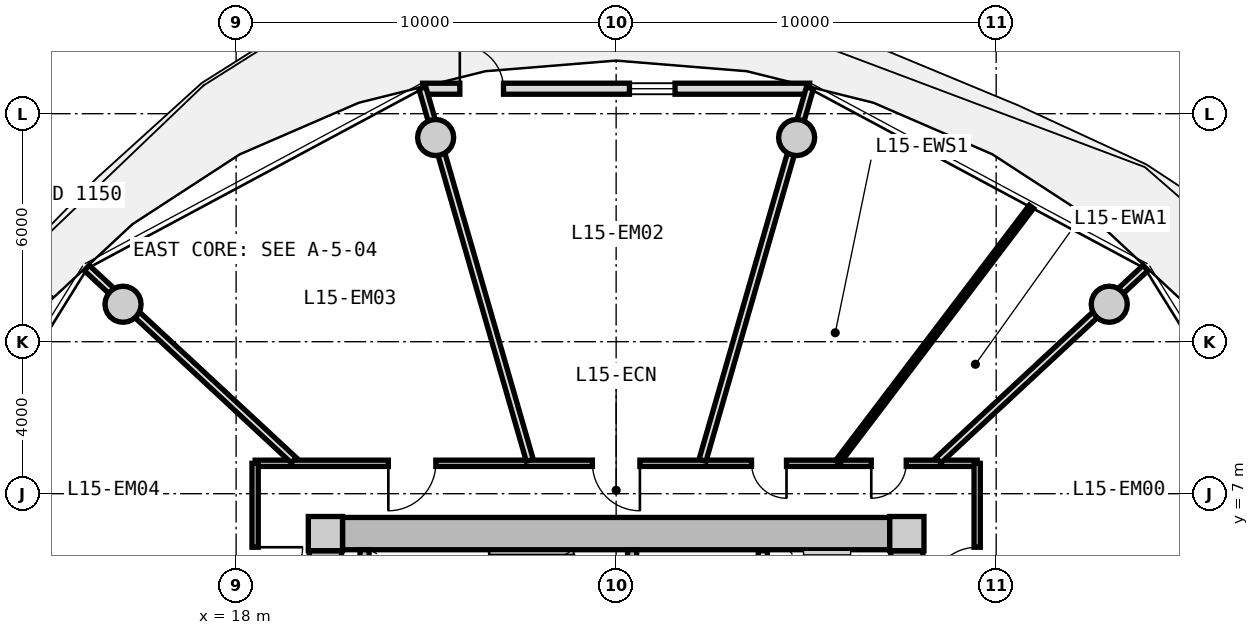
"""IFC4 building model, lengths in metres.
Left out: names, types, materials, properties, quantities, classifications, styles, units other than length and angle.
Written with IfcOpenShell. Run it as: python <this file> out.ifc"""

import sys

from ifc_helpers import new_model, si_unit, direction, frame, frame_2d, origin, origin_2d, place, context, subcontext, project, spatial, rectangle, circle, extrude, source, transform, mapped, element, fill, save


model = new_model("IFC4")
c1 = context("Model", 3, precision=1e-05, world=origin(), true_north=direction((0.0, 1.0)))
c2 = subcontext(c1, "Body", "Model", "MODEL_VIEW")
j1 = project(units=[si_unit("LENGTHUNIT", "METRE"), si_unit("PLANEANGLEUNIT", "RADIAN")], contexts=[c1])
p1 = place(None, origin())
s1 = spatial("IfcSite", under=j1, at=p1, CompositionType="ELEMENT")
p2 = place(p1, origin())
s2 = spatial("IfcBuilding", under=s1, at=p2, CompositionType="ELEMENT")
p3 = place(p2, frame((0.0, 0.0, 52.1)))
s3 = spatial("IfcBuildingStorey", under=s2, at=p3, CompositionType="ELEMENT", Elevation=52.1)
m1 = source(origin(), c2, "Body", "SweptSolid", [
    extrude(rectangle(XDim=0.9, YDim=0.9, at=origin_2d()), origin(), (0.0, 0.0, 1.0), 3.05),
])
for number, where, z_axis, x_axis in (
    (1, (35.65, 5.95, 0.0), (0.0, 0.0, 1.0), (1.0, 0.0, 0.0)),
    (2, (20.35, 5.95, 0.0), (0.0, 0.0, 1.0), (1.0, 0.0, 0.0)),
):
    element("IfcColumn", number, at=place(p3, frame(where, z_axis=z_axis, x_axis=x_axis)), inside=s3, PredefinedType="COLUMN", context=c2, shape_type="MappedRepresentation", body=[
        mapped(m1, transform((0.0, 0.0, 0.0), x_axis=(1.0, 0.0, 0.0), y_axis=(0.0, 1.0, 0.0), z_axis=(0.0, 0.0, 1.0), scale=1.0)),
    ])
m2 = source(origin(), c2, "Body", "SweptSolid", [
    extrude(rectangle(XDim=14.4, YDim=0.85, at=frame_2d((7.2, 0.0))), origin(), (0.0, 0.0, 1.0), 2.79),
])
p4 = place(p3, frame((20.8, 5.95, 0.0), z_axis=(0.0, 0.0, 1.0), x_axis=(1.0, 0.0, 0.0)))
e3 = element("IfcWall", 3, at=p4, inside=s3, PredefinedType="SHEAR", context=c2, shape_type="MappedRepresentation", body=[
    mapped(m2, transform((0.0, 0.0, 0.0), x_axis=(1.0, 0.0, 0.0), y_axis=(0.0, 1.0, 0.0), z_axis=(0.0, 0.0, 1.0), scale=1.0)),
])
m3 = source(origin(), c2, "Body", "SweptSolid", [
    extrude(rectangle(XDim=11.0, YDim=0.85, at=frame_2d((5.5, 0.0))), origin(), (0.0, 0.0, 1.0), 2.79),
])
p5 = place(p3, frame((20.35, -5.5, 0.0), z_axis=(0.0, 0.0, 1.0), x_axis=(0.0, 1.0, 0.0)))
e4 = element("IfcWall", 4, at=p5, inside=s3, PredefinedType="SHEAR", context=c2, shape_type="MappedRepresentation", body=[
    mapped(m3, transform((0.0, 0.0, 0.0), x_axis=(1.0, 0.0, 0.0), y_axis=(0.0, 1.0, 0.0), z_axis=(0.0, 0.0, 1.0), scale=1.0)),
])
p6 = place(p5, frame((3.8, 0.0, 0.0)))
e5 = element("IfcOpeningElement", 5, at=p6, cuts=e4, PredefinedType="OPENING", context=c2, shape_type="SweptSolid", body=[
    extrude(rectangle(XDim=1.2, YDim=2.15, at=frame_2d((0.6, 1.075))), frame((0.0, 0.435, 0.0), z_axis=(0.0, -1.0, 0.0), x_axis=(1.0, 0.0, 0.0)), (0.0, 0.0, 1.0), 0.87),
])
p7 = place(p3, frame((35.65, 5.5, 0.0), z_axis=(0.0, 0.0, 1.0), x_axis=(0.0, -1.0, 0.0)))
e6 = element("IfcWall", 6, at=p7, inside=s3, PredefinedType="SHEAR", context=c2, shape_type="MappedRepresentation", body=[
    mapped(m3, transform((0.0, 0.0, 0.0), x_axis=(1.0, 0.0, 0.0), y_axis=(0.0, 1.0, 0.0), z_axis=(0.0, 0.0, 1.0), scale=1.0)),
])
p8 = place(p7, frame((5.65, 0.0, 0.0)))
e7 = element("IfcOpeningElement", 7, at=p8, cuts=e6, PredefinedType="OPENING", context=c2, shape_type="SweptSolid", body=[
    extrude(rectangle(XDim=1.2, YDim=2.15, at=frame_2d((0.6, 1.075))), frame((0.0, 0.435, 0.0), z_axis=(0.0, -1.0, 0.0), x_axis=(1.0, 0.0, 0.0)), (0.0, 0.0, 1.0), 0.87),
])
m4 = source(origin(), c2, "Body", "SweptSolid", [
    extrude(circle(Radius=0.475, at=origin_2d()), origin(), (0.0, 0.0, 1.0), 3.05),
])
for number, where, z_axis, x_axis in (
    (8, (40.975, 11.985, 0.0), (0.0, 0.0, 1.0), (1.0, 0.0, 0.0)),
    (9, (32.749, 16.373, 0.0), (0.0, 0.0, 1.0), (1.0, 0.0, 0.0)),
    (10, (23.251, 16.373, 0.0), (0.0, 0.0, 1.0), (1.0, 0.0, 0.0)),
    (11, (15.025, 11.985, 0.0), (0.0, 0.0, 1.0), (1.0, 0.0, 0.0)),
):
    element("IfcColumn", number, at=place(p3, frame(where, z_axis=z_axis, x_axis=x_axis)), inside=s3, PredefinedType="COLUMN", context=c2, shape_type="MappedRepresentation", body=[
        mapped(m4, transform((0.0, 0.0, 0.0), x_axis=(1.0, 0.0, 0.0), y_axis=(0.0, 1.0, 0.0), z_axis=(0.0, 0.0, 1.0), scale=1.0)),
    ])
m5 = source(origin(), c2, "Body", "SweptSolid", [
    extrude(rectangle(XDim=10.187, YDim=0.29, at=frame_2d((5.094, 0.0))), origin(), (0.0, 0.0, 1.0), 2.79),
])
p9 = place(p3, frame((22.906, 17.657, 0.0), z_axis=(0.0, 0.0, 1.0), x_axis=(1.0, 0.0, 0.0)))
e12 = element("IfcWall", 12, at=p9, inside=s3, PredefinedType="SOLIDWALL", context=c2, shape_type="MappedRepresentation", body=[
    mapped(m5, transform((0.0, 0.0, 0.0), x_axis=(1.0, 0.0, 0.0), y_axis=(0.0, 1.0, 0.0), z_axis=(0.0, 0.0, 1.0), scale=1.0)),
])
p10 = place(p9, frame((0.98, 0.0, 0.0)))
e13 = element("IfcOpeningElement", 13, at=p10, cuts=e12, PredefinedType="OPENING", context=c2, shape_type="SweptSolid", body=[
    extrude(rectangle(XDim=1.15, YDim=2.25, at=frame_2d((0.575, 1.125))), frame((0.0, 0.155, 0.0), z_axis=(0.0, -1.0, 0.0), x_axis=(1.0, 0.0, 0.0)), (0.0, 0.0, 1.0), 0.31),
])
p11 = place(p9, frame((5.444, 0.0, 0.85)))
e14 = element("IfcOpeningElement", 14, at=p11, cuts=e12, PredefinedType="OPENING", context=c2, shape_type="SweptSolid", body=[
    extrude(rectangle(XDim=1.2, YDim=1.5, at=frame_2d((0.6, 0.75))), frame((0.0, 0.155, 0.0), z_axis=(0.0, -1.0, 0.0), x_axis=(1.0, 0.0, 0.0)), (0.0, 0.0, 1.0), 0.31),
])
m6 = source(origin(), c2, "Body", "SweptSolid", [
    extrude(rectangle(XDim=3.075, YDim=0.24, at=frame_2d((1.538, 0.0))), origin(), (0.0, 0.0, 1.0), 2.79),
])
p12 = place(p3, frame((21.38, 2.45, 0.0), z_axis=(0.0, 0.0, 1.0), x_axis=(0.0, 1.0, 0.0)))
e15 = element("IfcWall", 15, at=p12, inside=s3, PredefinedType="PARTITIONING", context=c2, shape_type="MappedRepresentation", body=[
    mapped(m6, transform((0.0, 0.0, 0.0), x_axis=(1.0, 0.0, 0.0), y_axis=(0.0, 1.0, 0.0), z_axis=(0.0, 0.0, 1.0), scale=1.0)),
])
p13 = place(p3, frame((28.42, 2.45, 0.0), z_axis=(0.0, 0.0, 1.0), x_axis=(0.0, 1.0, 0.0)))
e16 = element("IfcWall", 16, at=p13, inside=s3, PredefinedType="PARTITIONING", context=c2, shape_type="MappedRepresentation", body=[
    mapped(m6, transform((0.0, 0.0, 0.0), x_axis=(1.0, 0.0, 0.0), y_axis=(0.0, 1.0, 0.0), z_axis=(0.0, 0.0, 1.0), scale=1.0)),
])
p14 = place(p13, frame((0.55, 0.0, 0.0)))
e17 = element("IfcOpeningElement", 17, at=p14, cuts=e16, PredefinedType="OPENING", context=c2, shape_type="SweptSolid", body=[
    extrude(rectangle(XDim=1.1, YDim=2.15, at=frame_2d((0.55, 1.075))), frame((0.0, 0.13, 0.0), z_axis=(0.0, -1.0, 0.0), x_axis=(1.0, 0.0, 0.0)), (0.0, 0.0, 1.0), 0.26),
])
m7 = source(origin(), c2, "Body", "SweptSolid", [
    extrude(rectangle(XDim=5.0, YDim=0.24, at=frame_2d((2.5, 0.0))), origin(), (0.0, 0.0, 1.0), 2.775),
])
p15 = place(p3, frame((31.86, 0.5, 0.0), z_axis=(0.0, 0.0, 1.0), x_axis=(0.0, 1.0, 0.0)))
e18 = element("IfcWall", 18, at=p15, inside=s3, PredefinedType="PARTITIONING", context=c2, shape_type="MappedRepresentation", body=[
    mapped(m7, transform((0.0, 0.0, 0.0), x_axis=(1.0, 0.0, 0.0), y_axis=(0.0, 1.0, 0.0), z_axis=(0.0, 0.0, 1.0), scale=1.0)),
])
p16 = place(p15, frame((3.05, 0.0, 0.0)))
e19 = element("IfcOpeningElement", 19, at=p16, cuts=e18, PredefinedType="OPENING", context=c2, shape_type="SweptSolid", body=[
    extrude(rectangle(XDim=1.3, YDim=2.2, at=frame_2d((0.65, 1.1))), frame((0.0, 0.13, 0.0), z_axis=(0.0, -1.0, 0.0), x_axis=(1.0, 0.0, 0.0)), (0.0, 0.0, 1.0), 0.26),
])
p17 = place(p15, frame((0.55, 0.0, 0.0)))
e20 = element("IfcOpeningElement", 20, at=p17, cuts=e18, PredefinedType="OPENING", context=c2, shape_type="SweptSolid", body=[
    extrude(rectangle(XDim=1.3, YDim=2.2, at=frame_2d((0.65, 1.1))), frame((0.0, 0.13, 0.0), z_axis=(0.0, -1.0, 0.0), x_axis=(1.0, 0.0, 0.0)), (0.0, 0.0, 1.0), 0.26),
])
m8 = source(origin(), c2, "Body", "SweptSolid", [
    extrude(rectangle(XDim=19.0, YDim=0.165, at=frame_2d((9.5, 0.0))), origin(), (0.0, 0.0, 1.0), 2.775),
])
p18 = place(p3, frame((18.5, 7.8, 0.0), z_axis=(0.0, 0.0, 1.0), x_axis=(1.0, 0.0, 0.0)))
e21 = element("IfcWall", 21, at=p18, inside=s3, PredefinedType="PARTITIONING", context=c2, shape_type="MappedRepresentation", body=[
    mapped(m8, transform((0.0, 0.0, 0.0), x_axis=(1.0, 0.0, 0.0), y_axis=(0.0, 1.0, 0.0), z_axis=(0.0, 0.0, 1.0), scale=1.0)),
])
p19 = place(p18, frame((16.214, 0.0, 0.0)))
e22 = element("IfcOpeningElement", 22, at=p19, cuts=e21, PredefinedType="OPENING", context=c2, shape_type="SweptSolid", body=[
    extrude(rectangle(XDim=0.92, YDim=2.1, at=frame_2d((0.46, 1.05))), frame((0.0, 0.093, 0.0), z_axis=(0.0, -1.0, 0.0), x_axis=(1.0, 0.0, 0.0)), (0.0, 0.0, 1.0), 0.185),
])
p20 = place(p18, frame((13.063, 0.0, 0.0)))
e23 = element("IfcOpeningElement", 23, at=p20, cuts=e21, PredefinedType="OPENING", context=c2, shape_type="SweptSolid", body=[
    extrude(rectangle(XDim=0.92, YDim=2.1, at=frame_2d((0.46, 1.05))), frame((0.0, 0.093, 0.0), z_axis=(0.0, -1.0, 0.0), x_axis=(1.0, 0.0, 0.0)), (0.0, 0.0, 1.0), 0.185),
])
p21 = place(p18, frame((8.875, 0.0, 0.0)))
e24 = element("IfcOpeningElement", 24, at=p21, cuts=e21, PredefinedType="OPENING", context=c2, shape_type="SweptSolid", body=[
    extrude(rectangle(XDim=1.25, YDim=2.2, at=frame_2d((0.625, 1.1))), frame((0.0, 0.093, 0.0), z_axis=(0.0, -1.0, 0.0), x_axis=(1.0, 0.0, 0.0)), (0.0, 0.0, 1.0), 0.185),
])
p22 = place(p18, frame((3.506, 0.0, 0.0)))
e25 = element("IfcOpeningElement", 25, at=p22, cuts=e21, PredefinedType="OPENING", context=c2, shape_type="SweptSolid", body=[
    extrude(rectangle(XDim=1.25, YDim=2.2, at=frame_2d((0.625, 1.1))), frame((0.0, 0.093, 0.0), z_axis=(0.0, -1.0, 0.0), x_axis=(1.0, 0.0, 0.0)), (0.0, 0.0, 1.0), 0.185),
])
m9 = source(origin(), c2, "Body", "SweptSolid", [
    extrude(rectangle(XDim=15.6, YDim=0.165, at=frame_2d((7.8, 0.0))), origin(), (0.0, 0.0, 1.0), 2.775),
])
p23 = place(p3, frame((18.5, -7.8, 0.0), z_axis=(0.0, 0.0, 1.0), x_axis=(0.0, 1.0, 0.0)))
e26 = element("IfcWall", 26, at=p23, inside=s3, PredefinedType="PARTITIONING", context=c2, shape_type="MappedRepresentation", body=[
    mapped(m9, transform((0.0, 0.0, 0.0), x_axis=(1.0, 0.0, 0.0), y_axis=(0.0, 1.0, 0.0), z_axis=(0.0, 0.0, 1.0), scale=1.0)),
])
p24 = place(p23, frame((12.141, 0.0, 0.0)))
e27 = element("IfcOpeningElement", 27, at=p24, cuts=e26, PredefinedType="OPENING", context=c2, shape_type="SweptSolid", body=[
    extrude(rectangle(XDim=1.25, YDim=2.2, at=frame_2d((0.625, 1.1))), frame((0.0, 0.093, 0.0), z_axis=(0.0, -1.0, 0.0), x_axis=(1.0, 0.0, 0.0)), (0.0, 0.0, 1.0), 0.185),
])
p25 = place(p23, frame((7.175, 0.0, 0.0)))
e28 = element("IfcOpeningElement", 28, at=p25, cuts=e26, PredefinedType="OPENING", context=c2, shape_type="SweptSolid", body=[
    extrude(rectangle(XDim=1.25, YDim=2.2, at=frame_2d((0.625, 1.1))), frame((0.0, 0.093, 0.0), z_axis=(0.0, -1.0, 0.0), x_axis=(1.0, 0.0, 0.0)), (0.0, 0.0, 1.0), 0.185),
])
p26 = place(p23, frame((2.208, 0.0, 0.0)))
e29 = element("IfcOpeningElement", 29, at=p26, cuts=e26, PredefinedType="OPENING", context=c2, shape_type="SweptSolid", body=[
    extrude(rectangle(XDim=1.25, YDim=2.2, at=frame_2d((0.625, 1.1))), frame((0.0, 0.093, 0.0), z_axis=(0.0, -1.0, 0.0), x_axis=(1.0, 0.0, 0.0)), (0.0, 0.0, 1.0), 0.185),
])
p27 = place(p3, frame((37.5, 7.8, 0.0), z_axis=(0.0, 0.0, 1.0), x_axis=(0.0, -1.0, 0.0)))
e30 = element("IfcWall", 30, at=p27, inside=s3, PredefinedType="PARTITIONING", context=c2, shape_type="MappedRepresentation", body=[
    mapped(m9, transform((0.0, 0.0, 0.0), x_axis=(1.0, 0.0, 0.0), y_axis=(0.0, 1.0, 0.0), z_axis=(0.0, 0.0, 1.0), scale=1.0)),
])
p28 = place(p27, frame((8.835, 0.0, 0.0)))
e31 = element("IfcOpeningElement", 31, at=p28, cuts=e30, PredefinedType="OPENING", context=c2, shape_type="SweptSolid", body=[
    extrude(rectangle(XDim=1.05, YDim=2.15, at=frame_2d((0.525, 1.075))), frame((0.0, 0.093, 0.0), z_axis=(0.0, -1.0, 0.0), x_axis=(1.0, 0.0, 0.0)), (0.0, 0.0, 1.0), 0.185),
])
p29 = place(p27, frame((2.208, 0.0, 0.0)))
e32 = element("IfcOpeningElement", 32, at=p29, cuts=e30, PredefinedType="OPENING", context=c2, shape_type="SweptSolid", body=[
    extrude(rectangle(XDim=1.25, YDim=2.2, at=frame_2d((0.625, 1.1))), frame((0.0, 0.093, 0.0), z_axis=(0.0, -1.0, 0.0), x_axis=(1.0, 0.0, 0.0)), (0.0, 0.0, 1.0), 0.185),
])
m10 = source(origin(), c2, "Body", "SweptSolid", [
    extrude(rectangle(XDim=7.435, YDim=0.19, at=frame_2d((3.717, 0.0))), origin(), (0.0, 0.0, 1.0), 2.225),
])
for number, where, z_axis, x_axis in (
    (33, (19.517, 7.88, 0.0), (0.0, 0.0, 1.0), (-0.733, 0.681, 0.0)),
    (34, (36.483, 7.88, 0.0), (0.0, 0.0, 1.0), (0.733, 0.681, 0.0)),
):
    element("IfcWall", number, at=place(p3, frame(where, z_axis=z_axis, x_axis=x_axis)), inside=s3, PredefinedType="PARTITIONING", context=c2, shape_type="MappedRepresentation", body=[
        mapped(m10, transform((0.0, 0.0, 0.0), x_axis=(1.0, 0.0, 0.0), y_axis=(0.0, 1.0, 0.0), z_axis=(0.0, 0.0, 1.0), scale=1.0)),
    ])
m11 = source(origin(), c2, "Body", "SweptSolid", [
    extrude(rectangle(XDim=10.196, YDim=0.19, at=frame_2d((5.098, 0.0))), origin(), (0.0, 0.0, 1.0), 2.225),
])
p30 = place(p3, frame((30.273, 7.88, 0.0), z_axis=(0.0, 0.0, 1.0), x_axis=(0.277136420347, 0.960830580549, 0.0)))
e35 = element("IfcWall", 35, at=p30, inside=s3, PredefinedType="PARTITIONING", context=c2, shape_type="MappedRepresentation", body=[
    mapped(m11, transform((0.0, 0.0, 0.0), x_axis=(1.0, 0.0, 0.0), y_axis=(0.0, 1.0, 0.0), z_axis=(0.0, 0.0, 1.0), scale=1.0)),
])
m12 = source(origin(), c2, "Body", "SweptSolid", [
    extrude(rectangle(XDim=8.436, YDim=0.14, at=frame_2d((4.218, 0.0))), origin(), (0.0, 0.0, 1.0), 2.775),
])
p31 = place(p3, frame((33.828, 7.83, 0.0), z_axis=(0.0, 0.0, 1.0), x_axis=(0.604486552388, 0.796615345058, 0.0)))
e36 = element("IfcWall", 36, at=p31, inside=s3, PredefinedType="PARTITIONING", context=c2, shape_type="MappedRepresentation", body=[
    mapped(m12, transform((0.0, 0.0, 0.0), x_axis=(1.0, 0.0, 0.0), y_axis=(0.0, 1.0, 0.0), z_axis=(0.0, 0.0, 1.0), scale=1.0)),
])
p32 = place(p3, frame((25.727, 7.88, 0.0), z_axis=(0.0, 0.0, 1.0), x_axis=(-0.277136420347, 0.960830580549, 0.0)))
e37 = element("IfcWall", 37, at=p32, inside=s3, PredefinedType="PARTITIONING", context=c2, shape_type="MappedRepresentation", body=[
    mapped(m11, transform((0.0, 0.0, 0.0), x_axis=(1.0, 0.0, 0.0), y_axis=(0.0, 1.0, 0.0), z_axis=(0.0, 0.0, 1.0), scale=1.0)),
])
m13 = source(origin(), c2, "Body", "SweptSolid", [
    extrude(rectangle(XDim=1.15, YDim=2.25, at=frame_2d((0.575, 1.125))), frame((0.0, 0.025, 0.0), z_axis=(0.0, -1.0, 0.0), x_axis=(1.0, 0.0, 0.0)), (0.0, 0.0, 1.0), 0.05),
])
p33 = place(p10, origin())
e38 = element("IfcDoor", 38, at=p33, inside=s3, OperationType="SINGLE_SWING_LEFT", PredefinedType="DOOR", context=c2, shape_type="MappedRepresentation", body=[
    mapped(m13, transform((0.0, 0.0, 0.0), x_axis=(1.0, 0.0, 0.0), y_axis=(0.0, 1.0, 0.0), z_axis=(0.0, 0.0, 1.0), scale=1.0)),
])
fill(e13, e38)
m14 = source(origin(), c2, "Body", "SweptSolid", [
    extrude(rectangle(XDim=1.2, YDim=1.5, at=frame_2d((0.6, 0.75))), frame((0.0, 0.03, 0.0), z_axis=(0.0, -1.0, 0.0), x_axis=(1.0, 0.0, 0.0)), (0.0, 0.0, 1.0), 0.06),
])
p34 = place(p11, origin())
e39 = element("IfcWindow", 39, at=p34, inside=s3, PartitioningType="SINGLE_PANEL", PredefinedType="WINDOW", context=c2, shape_type="MappedRepresentation", body=[
    mapped(m14, transform((0.0, 0.0, 0.0), x_axis=(1.0, 0.0, 0.0), y_axis=(0.0, 1.0, 0.0), z_axis=(0.0, 0.0, 1.0), scale=1.0)),
])
fill(e14, e39)
m15 = source(origin(), c2, "Body", "SweptSolid", [
    extrude(rectangle(XDim=1.25, YDim=2.2, at=frame_2d((0.625, 1.1))), frame((0.0, 0.025, 0.0), z_axis=(0.0, -1.0, 0.0), x_axis=(1.0, 0.0, 0.0)), (0.0, 0.0, 1.0), 0.05),
])
p35 = place(p24, frame((1.25, 0.0, 0.0), z_axis=(0.0, 0.0, 1.0), x_axis=(-1.0, 0.0, 0.0)))
e40 = element("IfcDoor", 40, at=p35, inside=s3, OperationType="SINGLE_SWING_LEFT", PredefinedType="DOOR", context=c2, shape_type="MappedRepresentation", body=[
    mapped(m15, transform((0.0, 0.0, 0.0), x_axis=(1.0, 0.0, 0.0), y_axis=(0.0, 1.0, 0.0), z_axis=(0.0, 0.0, 1.0), scale=1.0)),
])
fill(e27, e40)
p36 = place(p29, frame((1.25, 0.0, 0.0), z_axis=(0.0, 0.0, 1.0), x_axis=(-1.0, 0.0, 0.0)))
e41 = element("IfcDoor", 41, at=p36, inside=s3, OperationType="SINGLE_SWING_LEFT", PredefinedType="DOOR", context=c2, shape_type="MappedRepresentation", body=[
    mapped(m15, transform((0.0, 0.0, 0.0), x_axis=(1.0, 0.0, 0.0), y_axis=(0.0, 1.0, 0.0), z_axis=(0.0, 0.0, 1.0), scale=1.0)),
])
fill(e32, e41)
m16 = source(origin(), c2, "Body", "SweptSolid", [
    extrude(rectangle(XDim=0.92, YDim=2.1, at=frame_2d((0.46, 1.05))), frame((0.0, 0.025, 0.0), z_axis=(0.0, -1.0, 0.0), x_axis=(1.0, 0.0, 0.0)), (0.0, 0.0, 1.0), 0.05),
])
p37 = place(p19, frame((0.92, 0.0, 0.0), z_axis=(0.0, 0.0, 1.0), x_axis=(-1.0, 0.0, 0.0)))
e42 = element("IfcDoor", 42, at=p37, inside=s3, OperationType="SINGLE_SWING_RIGHT", PredefinedType="DOOR", context=c2, shape_type="MappedRepresentation", body=[
    mapped(m16, transform((0.0, 0.0, 0.0), x_axis=(1.0, 0.0, 0.0), y_axis=(0.0, 1.0, 0.0), z_axis=(0.0, 0.0, 1.0), scale=1.0)),
])
fill(e22, e42)
p38 = place(p20, frame((0.92, 0.0, 0.0), z_axis=(0.0, 0.0, 1.0), x_axis=(-1.0, 0.0, 0.0)))
e43 = element("IfcDoor", 43, at=p38, inside=s3, OperationType="SINGLE_SWING_LEFT", PredefinedType="DOOR", context=c2, shape_type="MappedRepresentation", body=[
    mapped(m16, transform((0.0, 0.0, 0.0), x_axis=(1.0, 0.0, 0.0), y_axis=(0.0, 1.0, 0.0), z_axis=(0.0, 0.0, 1.0), scale=1.0)),
])
fill(e23, e43)
p39 = place(p21, frame((1.25, 0.0, 0.0), z_axis=(0.0, 0.0, 1.0), x_axis=(-1.0, 0.0, 0.0)))
e44 = element("IfcDoor", 44, at=p39, inside=s3, OperationType="SINGLE_SWING_LEFT", PredefinedType="DOOR", context=c2, shape_type="MappedRepresentation", body=[
    mapped(m15, transform((0.0, 0.0, 0.0), x_axis=(1.0, 0.0, 0.0), y_axis=(0.0, 1.0, 0.0), z_axis=(0.0, 0.0, 1.0), scale=1.0)),
])
fill(e24, e44)
p40 = place(p22, frame((1.25, 0.0, 0.0), z_axis=(0.0, 0.0, 1.0), x_axis=(-1.0, 0.0, 0.0)))
e45 = element("IfcDoor", 45, at=p40, inside=s3, OperationType="SINGLE_SWING_RIGHT", PredefinedType="DOOR", context=c2, shape_type="MappedRepresentation", body=[
    mapped(m15, transform((0.0, 0.0, 0.0), x_axis=(1.0, 0.0, 0.0), y_axis=(0.0, 1.0, 0.0), z_axis=(0.0, 0.0, 1.0), scale=1.0)),
])
fill(e25, e45)
save(model, sys.argv[1])
